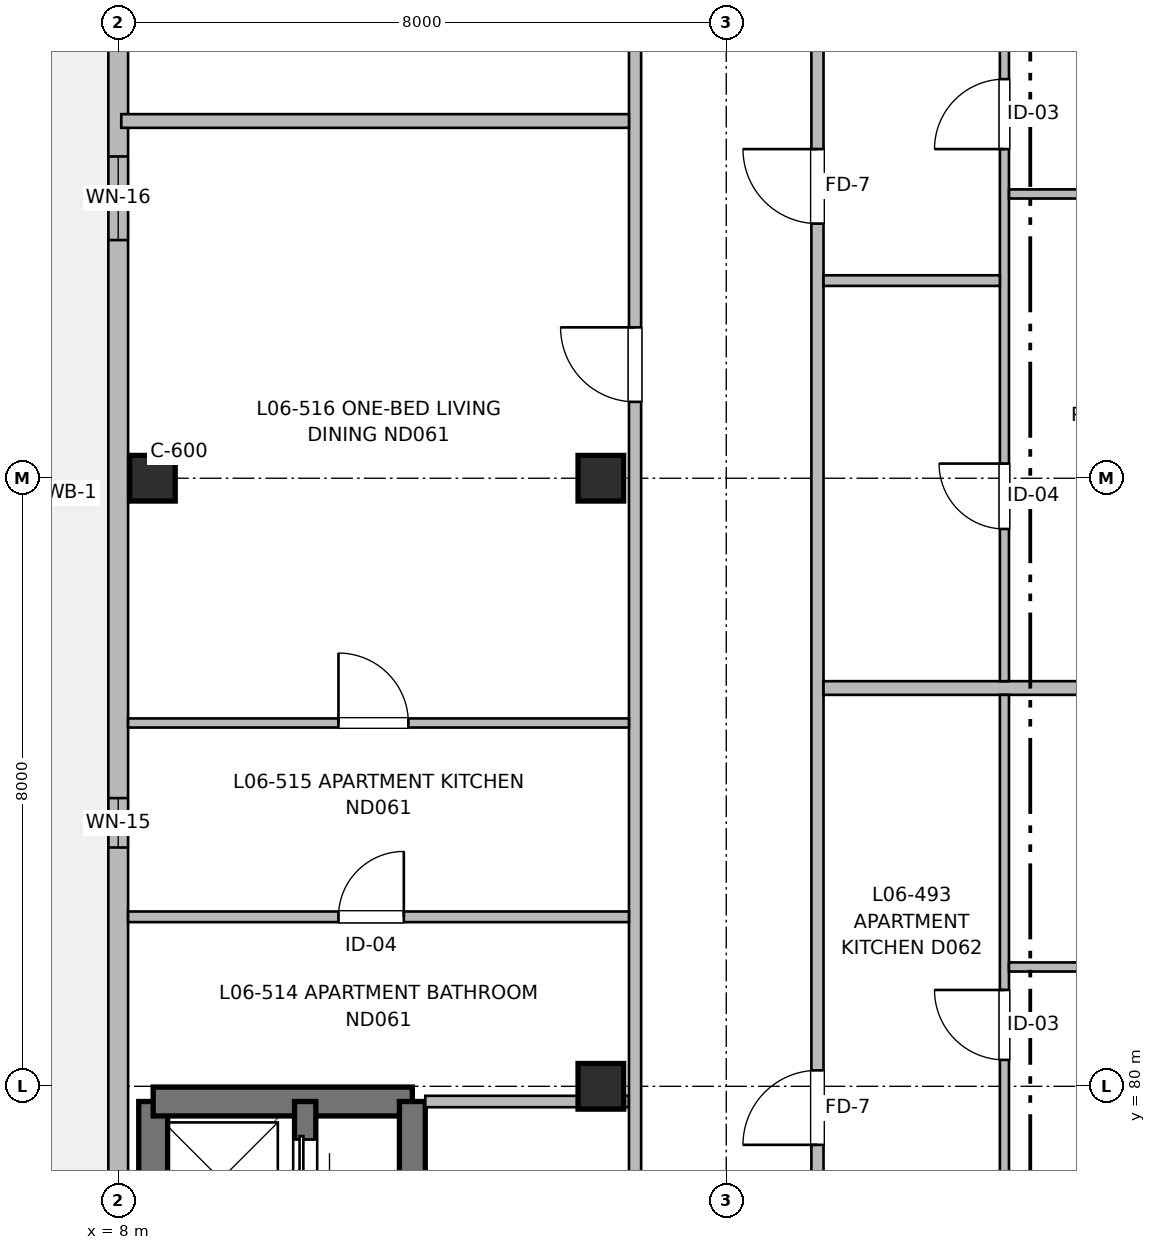
"""IFC4 building model, lengths in metres.
Left out: names, types, materials, properties, quantities, classifications, styles, units other than length and angle.
Written with IfcOpenShell. Run it as: python <this file> out.ifc"""

import sys

from ifc_helpers import new_model, si_unit, direction, frame, frame_2d, origin, origin_2d, place, context, subcontext, project, spatial, rectangle, extrude, element, fill, save


model = new_model("IFC4")
c1 = context("Model", 3, precision=1e-05, world=origin(), true_north=direction((0.0, 1.0)))
c2 = subcontext(c1, "Body", "Model", "MODEL_VIEW")
j1 = project(units=[si_unit("LENGTHUNIT", "METRE"), si_unit("PLANEANGLEUNIT", "RADIAN")], contexts=[c1])
p1 = place(None, origin())
s1 = spatial("IfcSite", under=j1, at=p1, CompositionType="ELEMENT")
p2 = place(p1, origin())
s2 = spatial("IfcBuilding", under=s1, at=p2, CompositionType="ELEMENT")
p3 = place(p2, frame((0.0, 0.0, 20.16)))
s3 = spatial("IfcBuildingStorey", under=s2, at=p3, CompositionType="ELEMENT", Elevation=20.16)
for number, where, z_axis, x_axis in (
    (1, (8.45, 88.0, 0.0), (0.0, 0.0, 1.0), (1.0, 0.0, 0.0)),
    (2, (14.35, 80.0, 0.0), (0.0, 0.0, 1.0), (1.0, 0.0, 0.0)),
    (3, (14.35, 88.0, 0.0), (0.0, 0.0, 1.0), (1.0, 0.0, 0.0)),
):
    element("IfcColumn", number, at=place(p3, frame(where, z_axis=z_axis, x_axis=x_axis)), inside=s3, PredefinedType="COLUMN", context=c2, shape_type="SweptSolid", body=[
        extrude(rectangle(XDim=0.6, YDim=0.6, at=origin_2d()), origin(), (0.0, 0.0, 1.0), 3.2),
    ])
p4 = place(p3, frame((8.46, 67.35, 0.0), z_axis=(0.0, 0.0, 1.0), x_axis=(0.0, 1.0, 0.0)))
e4 = element("IfcWall", 4, at=p4, inside=s3, PredefinedType="SHEAR", context=c2, shape_type="SweptSolid", body=[
    extrude(rectangle(XDim=12.45, YDim=0.38, at=frame_2d((6.225, 0.0))), origin(), (0.0, 0.0, 1.0), 3.2),
])
p5 = place(p4, frame((2.2, 0.0, 0.97)))
e5 = element("IfcOpeningElement", 5, at=p5, cuts=e4, PredefinedType="OPENING", context=c2, shape_type="SweptSolid", body=[
    extrude(rectangle(XDim=0.95, YDim=1.25, at=frame_2d((0.475, 0.625))), frame((0.0, 0.2, 0.0), z_axis=(0.0, -1.0, 0.0), x_axis=(1.0, 0.0, 0.0)), (0.0, 0.0, 1.0), 0.4),
])
p6 = place(p3, frame((8.46, 79.8, 0.0), z_axis=(0.0, 0.0, 1.0), x_axis=(1.0, 0.0, 0.0)))
e6 = element("IfcWall", 6, at=p6, inside=s3, PredefinedType="SHEAR", context=c2, shape_type="SweptSolid", body=[
    extrude(rectangle(XDim=3.41, YDim=0.38, at=frame_2d((1.705, 0.0))), origin(), (0.0, 0.0, 1.0), 3.2),
])
p7 = place(p3, frame((11.87, 79.8, 0.0), z_axis=(0.0, 0.0, 1.0), x_axis=(0.0, -1.0, 0.0)))
e7 = element("IfcWall", 7, at=p7, inside=s3, PredefinedType="SHEAR", context=c2, shape_type="SweptSolid", body=[
    extrude(rectangle(XDim=12.45, YDim=0.34, at=frame_2d((6.225, 0.0))), origin(), (0.0, 0.0, 1.0), 3.2),
])
p8 = place(p7, frame((10.85, 0.0, 0.0)))
e8 = element("IfcOpeningElement", 8, at=p8, cuts=e7, PredefinedType="OPENING", context=c2, shape_type="SweptSolid", body=[
    extrude(rectangle(XDim=1.05, YDim=2.15, at=frame_2d((0.525, 1.075))), frame((0.0, 0.18, 0.0), z_axis=(0.0, -1.0, 0.0), x_axis=(1.0, 0.0, 0.0)), (0.0, 0.0, 1.0), 0.36),
])
p9 = place(p3, frame((10.46, 74.55, 0.0), z_axis=(0.0, 0.0, 1.0), x_axis=(0.0, 1.0, 0.0)))
e9 = element("IfcWall", 9, at=p9, inside=s3, PredefinedType="SHEAR", context=c2, shape_type="SweptSolid", body=[
    extrude(rectangle(XDim=5.25, YDim=0.28, at=frame_2d((2.625, 0.0))), origin(), (0.0, 0.0, 1.0), 3.2),
])
p10 = place(p9, frame((1.15, 0.0, 0.0)))
e10 = element("IfcOpeningElement", 10, at=p10, cuts=e9, PredefinedType="OPENING", context=c2, shape_type="SweptSolid", body=[
    extrude(rectangle(XDim=1.0, YDim=2.15, at=frame_2d((0.5, 1.075))), frame((0.0, 0.15, 0.0), z_axis=(0.0, -1.0, 0.0), x_axis=(1.0, 0.0, 0.0)), (0.0, 0.0, 1.0), 0.3),
])
p11 = place(p9, frame((3.85, 0.0, 0.0)))
e11 = element("IfcOpeningElement", 11, at=p11, cuts=e9, PredefinedType="OPENING", context=c2, shape_type="SweptSolid", body=[
    extrude(rectangle(XDim=0.9, YDim=2.15, at=frame_2d((0.45, 1.075))), frame((0.0, 0.15, 0.0), z_axis=(0.0, -1.0, 0.0), x_axis=(1.0, 0.0, 0.0)), (0.0, 0.0, 1.0), 0.3),
])
p12 = place(p3, frame((8.0, 61.8, 0.0), z_axis=(0.0, 0.0, 1.0), x_axis=(0.0, 1.0, 0.0)))
e12 = element("IfcWall", 12, at=p12, inside=s3, PredefinedType="SOLIDWALL", context=c2, shape_type="SweptSolid", body=[
    extrude(rectangle(XDim=52.0, YDim=0.26, at=frame_2d((26.0, 0.0))), origin(), (0.0, 0.0, 1.0), 2.98),
])
p13 = place(p12, frame((3.283, 0.0, 0.0)))
e13 = element("IfcOpeningElement", 13, at=p13, cuts=e12, PredefinedType="OPENING", context=c2, shape_type="SweptSolid", body=[
    extrude(rectangle(XDim=1.2, YDim=2.2, at=frame_2d((0.6, 1.1))), frame((0.0, 0.14, 0.0), z_axis=(0.0, -1.0, 0.0), x_axis=(1.0, 0.0, 0.0)), (0.0, 0.0, 1.0), 0.28),
])
p14 = place(p12, frame((6.083, 0.0, 0.57)))
e14 = element("IfcOpeningElement", 14, at=p14, cuts=e12, PredefinedType="OPENING", context=c2, shape_type="SweptSolid", body=[
    extrude(rectangle(XDim=2.3, YDim=1.65, at=frame_2d((1.15, 0.825))), frame((0.0, 0.14, 0.0), z_axis=(0.0, -1.0, 0.0), x_axis=(1.0, 0.0, 0.0)), (0.0, 0.0, 1.0), 0.28),
])
p15 = place(p12, frame((12.85, 0.0, 0.9)))
e15 = element("IfcOpeningElement", 15, at=p15, cuts=e12, PredefinedType="OPENING", context=c2, shape_type="SweptSolid", body=[
    extrude(rectangle(XDim=1.2, YDim=1.05, at=frame_2d((0.6, 0.525))), frame((0.0, 0.14, 0.0), z_axis=(0.0, -1.0, 0.0), x_axis=(1.0, 0.0, 0.0)), (0.0, 0.0, 1.0), 0.28),
])
p16 = place(p12, frame((21.342, 0.0, 0.9)))
e16 = element("IfcOpeningElement", 16, at=p16, cuts=e12, PredefinedType="OPENING", context=c2, shape_type="SweptSolid", body=[
    extrude(rectangle(XDim=0.65, YDim=0.95, at=frame_2d((0.325, 0.475))), frame((0.0, 0.14, 0.0), z_axis=(0.0, -1.0, 0.0), x_axis=(1.0, 0.0, 0.0)), (0.0, 0.0, 1.0), 0.28),
])
p17 = place(p12, frame((29.333, 0.0, 0.62)))
e17 = element("IfcOpeningElement", 17, at=p17, cuts=e12, PredefinedType="OPENING", context=c2, shape_type="SweptSolid", body=[
    extrude(rectangle(XDim=1.1, YDim=1.6, at=frame_2d((0.55, 0.8))), frame((0.0, 0.14, 0.0), z_axis=(0.0, -1.0, 0.0), x_axis=(1.0, 0.0, 0.0)), (0.0, 0.0, 1.0), 0.28),
])
p18 = place(p12, frame((35.3, 0.0, 0.47)))
e18 = element("IfcOpeningElement", 18, at=p18, cuts=e12, PredefinedType="OPENING", context=c2, shape_type="SweptSolid", body=[
    extrude(rectangle(XDim=2.7, YDim=1.75, at=frame_2d((1.35, 0.875))), frame((0.0, 0.14, 0.0), z_axis=(0.0, -1.0, 0.0), x_axis=(1.0, 0.0, 0.0)), (0.0, 0.0, 1.0), 0.28),
])
p19 = place(p12, frame((45.517, 0.0, 0.72)))
e19 = element("IfcOpeningElement", 19, at=p19, cuts=e12, PredefinedType="OPENING", context=c2, shape_type="SweptSolid", body=[
    extrude(rectangle(XDim=1.7, YDim=1.5, at=frame_2d((0.85, 0.75))), frame((0.0, 0.14, 0.0), z_axis=(0.0, -1.0, 0.0), x_axis=(1.0, 0.0, 0.0)), (0.0, 0.0, 1.0), 0.28),
])
p20 = place(p3, frame((12.04, 79.8, 0.0), z_axis=(0.0, 0.0, 1.0), x_axis=(1.0, 0.0, 0.0)))
e20 = element("IfcWall", 20, at=p20, inside=s3, PredefinedType="PARTITIONING", context=c2, shape_type="SweptSolid", body=[
    extrude(rectangle(XDim=2.68, YDim=0.15, at=frame_2d((1.34, 0.0))), origin(), (0.0, 0.0, 1.0), 2.935),
])
p21 = place(p3, frame((14.8, 61.96, 0.0), z_axis=(0.0, 0.0, 1.0), x_axis=(0.0, 1.0, 0.0)))
e21 = element("IfcWall", 21, at=p21, inside=s3, PredefinedType="PARTITIONING", context=c2, shape_type="SweptSolid", body=[
    extrude(rectangle(XDim=44.84, YDim=0.16, at=frame_2d((22.42, 0.0))), origin(), (0.0, 0.0, 1.0), 2.935),
])
p22 = place(p21, frame((7.04, 0.0, 0.0)))
e22 = element("IfcOpeningElement", 22, at=p22, cuts=e21, PredefinedType="OPENING", context=c2, shape_type="SweptSolid", body=[
    extrude(rectangle(XDim=1.1, YDim=2.15, at=frame_2d((0.55, 1.075))), frame((0.0, 0.09, 0.0), z_axis=(0.0, -1.0, 0.0), x_axis=(1.0, 0.0, 0.0)), (0.0, 0.0, 1.0), 0.18),
])
p23 = place(p21, frame((13.44, 0.0, 0.0)))
e23 = element("IfcOpeningElement", 23, at=p23, cuts=e21, PredefinedType="OPENING", context=c2, shape_type="SweptSolid", body=[
    extrude(rectangle(XDim=1.6, YDim=2.15, at=frame_2d((0.8, 1.075))), frame((0.0, 0.09, 0.0), z_axis=(0.0, -1.0, 0.0), x_axis=(1.0, 0.0, 0.0)), (0.0, 0.0, 1.0), 0.18),
])
p24 = place(p21, frame((3.0, 0.0, 0.0)))
e24 = element("IfcOpeningElement", 24, at=p24, cuts=e21, PredefinedType="OPENING", context=c2, shape_type="SweptSolid", body=[
    extrude(rectangle(XDim=0.96, YDim=2.15, at=frame_2d((0.48, 1.075))), frame((0.0, 0.09, 0.0), z_axis=(0.0, -1.0, 0.0), x_axis=(1.0, 0.0, 0.0)), (0.0, 0.0, 1.0), 0.18),
])
p25 = place(p21, frame((27.045, 0.0, 0.0)))
e25 = element("IfcOpeningElement", 25, at=p25, cuts=e21, PredefinedType="OPENING", context=c2, shape_type="SweptSolid", body=[
    extrude(rectangle(XDim=0.98, YDim=2.15, at=frame_2d((0.49, 1.075))), frame((0.0, 0.09, 0.0), z_axis=(0.0, -1.0, 0.0), x_axis=(1.0, 0.0, 0.0)), (0.0, 0.0, 1.0), 0.18),
])
p26 = place(p21, frame((34.855, 0.0, 0.0)))
e26 = element("IfcOpeningElement", 26, at=p26, cuts=e21, PredefinedType="OPENING", context=c2, shape_type="SweptSolid", body=[
    extrude(rectangle(XDim=0.98, YDim=2.15, at=frame_2d((0.49, 1.075))), frame((0.0, 0.09, 0.0), z_axis=(0.0, -1.0, 0.0), x_axis=(1.0, 0.0, 0.0)), (0.0, 0.0, 1.0), 0.18),
])
p27 = place(p3, frame((17.2, 61.96, 0.0), z_axis=(0.0, 0.0, 1.0), x_axis=(0.0, 1.0, 0.0)))
e27 = element("IfcWall", 27, at=p27, inside=s3, PredefinedType="PARTITIONING", context=c2, shape_type="SweptSolid", body=[
    extrude(rectangle(XDim=44.84, YDim=0.16, at=frame_2d((22.42, 0.0))), origin(), (0.0, 0.0, 1.0), 2.935),
])
p28 = place(p27, frame((4.575, 0.0, 0.0)))
e28 = element("IfcOpeningElement", 28, at=p28, cuts=e27, PredefinedType="OPENING", context=c2, shape_type="SweptSolid", body=[
    extrude(rectangle(XDim=1.5, YDim=2.2, at=frame_2d((0.75, 1.1))), frame((0.0, 0.09, 0.0), z_axis=(0.0, -1.0, 0.0), x_axis=(1.0, 0.0, 0.0)), (0.0, 0.0, 1.0), 0.18),
])
p29 = place(p27, frame((17.27, 0.0, 0.0)))
e29 = element("IfcOpeningElement", 29, at=p29, cuts=e27, PredefinedType="OPENING", context=c2, shape_type="SweptSolid", body=[
    extrude(rectangle(XDim=0.98, YDim=2.15, at=frame_2d((0.49, 1.075))), frame((0.0, 0.09, 0.0), z_axis=(0.0, -1.0, 0.0), x_axis=(1.0, 0.0, 0.0)), (0.0, 0.0, 1.0), 0.18),
])
p30 = place(p27, frame((29.39, 0.0, 0.0)))
e30 = element("IfcOpeningElement", 30, at=p30, cuts=e27, PredefinedType="OPENING", context=c2, shape_type="SweptSolid", body=[
    extrude(rectangle(XDim=0.98, YDim=2.15, at=frame_2d((0.49, 1.075))), frame((0.0, 0.09, 0.0), z_axis=(0.0, -1.0, 0.0), x_axis=(1.0, 0.0, 0.0)), (0.0, 0.0, 1.0), 0.18),
])
p31 = place(p27, frame((40.24, 0.0, 0.0)))
e31 = element("IfcOpeningElement", 31, at=p31, cuts=e27, PredefinedType="OPENING", context=c2, shape_type="SweptSolid", body=[
    extrude(rectangle(XDim=0.98, YDim=2.15, at=frame_2d((0.49, 1.075))), frame((0.0, 0.09, 0.0), z_axis=(0.0, -1.0, 0.0), x_axis=(1.0, 0.0, 0.0)), (0.0, 0.0, 1.0), 0.18),
])
p32 = place(p3, frame((17.28, 85.24, 0.0), z_axis=(0.0, 0.0, 1.0), x_axis=(1.0, 0.0, 0.0)))
e32 = element("IfcWall", 32, at=p32, inside=s3, PredefinedType="PARTITIONING", context=c2, shape_type="SweptSolid", body=[
    extrude(rectangle(XDim=6.59, YDim=0.18, at=frame_2d((3.295, 0.0))), origin(), (0.0, 0.0, 1.0), 2.935),
])
p33 = place(p3, frame((19.66, 72.79, 0.0), z_axis=(0.0, 0.0, 1.0), x_axis=(0.0, 1.0, 0.0)))
e33 = element("IfcWall", 33, at=p33, inside=s3, PredefinedType="PARTITIONING", context=c2, shape_type="SweptSolid", body=[
    extrude(rectangle(XDim=12.36, YDim=0.12, at=frame_2d((6.18, 0.0))), origin(), (0.0, 0.0, 1.0), 2.935),
])
p34 = place(p33, frame((2.162, 0.0, 0.0)))
e34 = element("IfcOpeningElement", 34, at=p34, cuts=e33, PredefinedType="OPENING", context=c2, shape_type="SweptSolid", body=[
    extrude(rectangle(XDim=0.86, YDim=2.1, at=frame_2d((0.43, 1.05))), frame((0.0, 0.07, 0.0), z_axis=(0.0, -1.0, 0.0), x_axis=(1.0, 0.0, 0.0)), (0.0, 0.0, 1.0), 0.14),
])
p35 = place(p33, frame((7.558, 0.0, 0.0)))
e35 = element("IfcOpeningElement", 35, at=p35, cuts=e33, PredefinedType="OPENING", context=c2, shape_type="SweptSolid", body=[
    extrude(rectangle(XDim=0.92, YDim=2.1, at=frame_2d((0.46, 1.05))), frame((0.0, 0.07, 0.0), z_axis=(0.0, -1.0, 0.0), x_axis=(1.0, 0.0, 0.0)), (0.0, 0.0, 1.0), 0.14),
])
p36 = place(p3, frame((19.72, 81.57, 0.0), z_axis=(0.0, 0.0, 1.0), x_axis=(1.0, 0.0, 0.0)))
e36 = element("IfcWall", 36, at=p36, inside=s3, PredefinedType="PARTITIONING", context=c2, shape_type="SweptSolid", body=[
    extrude(rectangle(XDim=4.15, YDim=0.12, at=frame_2d((2.075, 0.0))), origin(), (0.0, 0.0, 1.0), 2.935),
])
p37 = place(p36, frame((1.635, 0.0, 0.0)))
e37 = element("IfcOpeningElement", 37, at=p37, cuts=e36, PredefinedType="OPENING", context=c2, shape_type="SweptSolid", body=[
    extrude(rectangle(XDim=0.88, YDim=2.1, at=frame_2d((0.44, 1.05))), frame((0.0, 0.07, 0.0), z_axis=(0.0, -1.0, 0.0), x_axis=(1.0, 0.0, 0.0)), (0.0, 0.0, 1.0), 0.14),
])
p38 = place(p3, frame((19.66, 85.33, 0.0), z_axis=(0.0, 0.0, 1.0), x_axis=(0.0, 1.0, 0.0)))
e38 = element("IfcWall", 38, at=p38, inside=s3, PredefinedType="PARTITIONING", context=c2, shape_type="SweptSolid", body=[
    extrude(rectangle(XDim=11.45, YDim=0.12, at=frame_2d((5.725, 0.0))), origin(), (0.0, 0.0, 1.0), 2.935),
])
p39 = place(p38, frame((2.003, 0.0, 0.0)))
e39 = element("IfcOpeningElement", 39, at=p39, cuts=e38, PredefinedType="OPENING", context=c2, shape_type="SweptSolid", body=[
    extrude(rectangle(XDim=0.86, YDim=2.1, at=frame_2d((0.43, 1.05))), frame((0.0, 0.07, 0.0), z_axis=(0.0, -1.0, 0.0), x_axis=(1.0, 0.0, 0.0)), (0.0, 0.0, 1.0), 0.14),
])
p40 = place(p38, frame((7.0, 0.0, 0.0)))
e40 = element("IfcOpeningElement", 40, at=p40, cuts=e38, PredefinedType="OPENING", context=c2, shape_type="SweptSolid", body=[
    extrude(rectangle(XDim=0.92, YDim=2.1, at=frame_2d((0.46, 1.05))), frame((0.0, 0.07, 0.0), z_axis=(0.0, -1.0, 0.0), x_axis=(1.0, 0.0, 0.0)), (0.0, 0.0, 1.0), 0.14),
])
p41 = place(p3, frame((17.28, 90.6, 0.0), z_axis=(0.0, 0.0, 1.0), x_axis=(1.0, 0.0, 0.0)))
e41 = element("IfcWall", 41, at=p41, inside=s3, PredefinedType="PARTITIONING", context=c2, shape_type="SweptSolid", body=[
    extrude(rectangle(XDim=2.32, YDim=0.14, at=frame_2d((1.16, 0.0))), origin(), (0.0, 0.0, 1.0), 2.935),
])
p42 = place(p3, frame((19.72, 91.74, 0.0), z_axis=(0.0, 0.0, 1.0), x_axis=(1.0, 0.0, 0.0)))
e42 = element("IfcWall", 42, at=p42, inside=s3, PredefinedType="PARTITIONING", context=c2, shape_type="SweptSolid", body=[
    extrude(rectangle(XDim=5.991, YDim=0.12, at=frame_2d((2.995, 0.0))), origin(), (0.0, 0.0, 1.0), 2.935),
])
p43 = place(p42, frame((1.625, 0.0, 0.0)))
e43 = element("IfcOpeningElement", 43, at=p43, cuts=e42, PredefinedType="OPENING", context=c2, shape_type="SweptSolid", body=[
    extrude(rectangle(XDim=0.9, YDim=2.1, at=frame_2d((0.45, 1.05))), frame((0.0, 0.07, 0.0), z_axis=(0.0, -1.0, 0.0), x_axis=(1.0, 0.0, 0.0)), (0.0, 0.0, 1.0), 0.14),
])
p44 = place(p3, frame((8.04, 92.7, 0.0), z_axis=(0.0, 0.0, 1.0), x_axis=(1.0, 0.0, 0.0)))
e44 = element("IfcWall", 44, at=p44, inside=s3, PredefinedType="PARTITIONING", context=c2, shape_type="SweptSolid", body=[
    extrude(rectangle(XDim=6.68, YDim=0.18, at=frame_2d((3.34, 0.0))), origin(), (0.0, 0.0, 1.0), 2.935),
])
p45 = place(p3, frame((8.13, 82.23, 0.0), z_axis=(0.0, 0.0, 1.0), x_axis=(1.0, 0.0, 0.0)))
e45 = element("IfcWall", 45, at=p45, inside=s3, PredefinedType="PARTITIONING", context=c2, shape_type="SweptSolid", body=[
    extrude(rectangle(XDim=6.59, YDim=0.14, at=frame_2d((3.295, 0.0))), origin(), (0.0, 0.0, 1.0), 2.935),
])
p46 = place(p45, frame((2.768, 0.0, 0.0)))
e46 = element("IfcOpeningElement", 46, at=p46, cuts=e45, PredefinedType="OPENING", context=c2, shape_type="SweptSolid", body=[
    extrude(rectangle(XDim=0.86, YDim=2.1, at=frame_2d((0.43, 1.05))), frame((0.0, 0.08, 0.0), z_axis=(0.0, -1.0, 0.0), x_axis=(1.0, 0.0, 0.0)), (0.0, 0.0, 1.0), 0.16),
])
p47 = place(p3, frame((8.13, 84.78, 0.0), z_axis=(0.0, 0.0, 1.0), x_axis=(1.0, 0.0, 0.0)))
e47 = element("IfcWall", 47, at=p47, inside=s3, PredefinedType="PARTITIONING", context=c2, shape_type="SweptSolid", body=[
    extrude(rectangle(XDim=6.59, YDim=0.12, at=frame_2d((3.295, 0.0))), origin(), (0.0, 0.0, 1.0), 2.935),
])
p48 = place(p47, frame((2.768, 0.0, 0.0)))
e48 = element("IfcOpeningElement", 48, at=p48, cuts=e47, PredefinedType="OPENING", context=c2, shape_type="SweptSolid", body=[
    extrude(rectangle(XDim=0.92, YDim=2.1, at=frame_2d((0.46, 1.05))), frame((0.0, 0.07, 0.0), z_axis=(0.0, -1.0, 0.0), x_axis=(1.0, 0.0, 0.0)), (0.0, 0.0, 1.0), 0.14),
])
p49 = place(p11, origin())
e49 = element("IfcDoor", 49, at=p49, inside=s3, OperationType="SLIDING_TO_RIGHT", PredefinedType="DOOR", context=c2, shape_type="SweptSolid", body=[
    extrude(rectangle(XDim=0.9, YDim=2.15, at=frame_2d((0.45, 1.075))), frame((0.0, 0.025, 0.0), z_axis=(0.0, -1.0, 0.0), x_axis=(1.0, 0.0, 0.0)), (0.0, 0.0, 1.0), 0.05),
])
fill(e11, e49)
p50 = place(p16, origin())
e50 = element("IfcWindow", 50, at=p50, inside=s3, PartitioningType="SINGLE_PANEL", PredefinedType="WINDOW", context=c2, shape_type="SweptSolid", body=[
    extrude(rectangle(XDim=0.65, YDim=0.95, at=frame_2d((0.325, 0.475))), frame((0.0, 0.03, 0.0), z_axis=(0.0, -1.0, 0.0), x_axis=(1.0, 0.0, 0.0)), (0.0, 0.0, 1.0), 0.06),
])
fill(e16, e50)
p51 = place(p17, origin())
e51 = element("IfcWindow", 51, at=p51, inside=s3, PartitioningType="SINGLE_PANEL", PredefinedType="WINDOW", context=c2, shape_type="SweptSolid", body=[
    extrude(rectangle(XDim=1.1, YDim=1.6, at=frame_2d((0.55, 0.8))), frame((0.0, 0.03, 0.0), z_axis=(0.0, -1.0, 0.0), x_axis=(1.0, 0.0, 0.0)), (0.0, 0.0, 1.0), 0.06),
])
fill(e17, e51)
p52 = place(p35, origin())
e52 = element("IfcDoor", 52, at=p52, inside=s3, OperationType="SINGLE_SWING_RIGHT", PredefinedType="DOOR", context=c2, shape_type="SweptSolid", body=[
    extrude(rectangle(XDim=0.92, YDim=2.1, at=frame_2d((0.46, 1.05))), frame((0.0, 0.025, 0.0), z_axis=(0.0, -1.0, 0.0), x_axis=(1.0, 0.0, 0.0)), (0.0, 0.0, 1.0), 0.05),
])
fill(e35, e52)
p53 = place(p29, origin())
e53 = element("IfcDoor", 53, at=p53, inside=s3, OperationType="SINGLE_SWING_LEFT", PredefinedType="DOOR", context=c2, shape_type="SweptSolid", body=[
    extrude(rectangle(XDim=0.98, YDim=2.15, at=frame_2d((0.49, 1.075))), frame((0.0, 0.025, 0.0), z_axis=(0.0, -1.0, 0.0), x_axis=(1.0, 0.0, 0.0)), (0.0, 0.0, 1.0), 0.05),
])
fill(e29, e53)
p54 = place(p39, origin())
e54 = element("IfcDoor", 54, at=p54, inside=s3, OperationType="SINGLE_SWING_RIGHT", PredefinedType="DOOR", context=c2, shape_type="SweptSolid", body=[
    extrude(rectangle(XDim=0.86, YDim=2.1, at=frame_2d((0.43, 1.05))), frame((0.0, 0.025, 0.0), z_axis=(0.0, -1.0, 0.0), x_axis=(1.0, 0.0, 0.0)), (0.0, 0.0, 1.0), 0.05),
])
fill(e39, e54)
p55 = place(p40, origin())
e55 = element("IfcDoor", 55, at=p55, inside=s3, OperationType="SINGLE_SWING_LEFT", PredefinedType="DOOR", context=c2, shape_type="SweptSolid", body=[
    extrude(rectangle(XDim=0.92, YDim=2.1, at=frame_2d((0.46, 1.05))), frame((0.0, 0.025, 0.0), z_axis=(0.0, -1.0, 0.0), x_axis=(1.0, 0.0, 0.0)), (0.0, 0.0, 1.0), 0.05),
])
fill(e40, e55)
p56 = place(p30, origin())
e56 = element("IfcDoor", 56, at=p56, inside=s3, OperationType="SINGLE_SWING_RIGHT", PredefinedType="DOOR", context=c2, shape_type="SweptSolid", body=[
    extrude(rectangle(XDim=0.98, YDim=2.15, at=frame_2d((0.49, 1.075))), frame((0.0, 0.025, 0.0), z_axis=(0.0, -1.0, 0.0), x_axis=(1.0, 0.0, 0.0)), (0.0, 0.0, 1.0), 0.05),
])
fill(e30, e56)
p57 = place(p46, origin())
e57 = element("IfcDoor", 57, at=p57, inside=s3, OperationType="SINGLE_SWING_RIGHT", PredefinedType="DOOR", context=c2, shape_type="SweptSolid", body=[
    extrude(rectangle(XDim=0.86, YDim=2.1, at=frame_2d((0.43, 1.05))), frame((0.0, 0.025, 0.0), z_axis=(0.0, -1.0, 0.0), x_axis=(1.0, 0.0, 0.0)), (0.0, 0.0, 1.0), 0.05),
])
fill(e46, e57)
p58 = place(p48, origin())
e58 = element("IfcDoor", 58, at=p58, inside=s3, OperationType="SINGLE_SWING_LEFT", PredefinedType="DOOR", context=c2, shape_type="SweptSolid", body=[
    extrude(rectangle(XDim=0.92, YDim=2.1, at=frame_2d((0.46, 1.05))), frame((0.0, 0.025, 0.0), z_axis=(0.0, -1.0, 0.0), x_axis=(1.0, 0.0, 0.0)), (0.0, 0.0, 1.0), 0.05),
])
fill(e48, e58)
p59 = place(p25, origin())
e59 = element("IfcDoor", 59, at=p59, inside=s3, OperationType="SINGLE_SWING_RIGHT", PredefinedType="DOOR", context=c2, shape_type="SweptSolid", body=[
    extrude(rectangle(XDim=0.98, YDim=2.15, at=frame_2d((0.49, 1.075))), frame((0.0, 0.025, 0.0), z_axis=(0.0, -1.0, 0.0), x_axis=(1.0, 0.0, 0.0)), (0.0, 0.0, 1.0), 0.05),
])
fill(e25, e59)
save(model, sys.argv[1])
